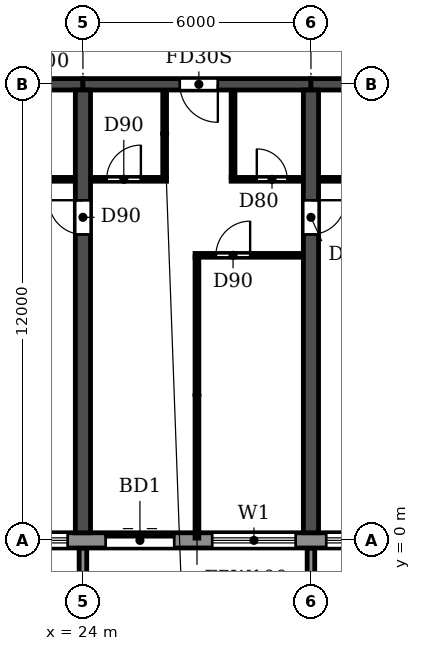
"""IFC4 building model, lengths in metres.
Left out: names, types, materials, properties, quantities, classifications, styles, units other than length and angle.
Written with IfcOpenShell. Run it as: python <this file> out.ifc"""

import sys

from ifc_helpers import new_model, si_unit, direction, frame, frame_2d, origin, place, context, subcontext, project, spatial, polyline, rectangle, outline, extrude, source, transform, mapped, element, fill, save


model = new_model("IFC4")
c1 = context("Model", 3, precision=1e-05, world=origin(), true_north=direction((0.0, 1.0)))
c2 = subcontext(c1, "Body", "Model", "MODEL_VIEW")
j1 = project(units=[si_unit("LENGTHUNIT", "METRE"), si_unit("PLANEANGLEUNIT", "RADIAN")], contexts=[c1])
p1 = place(None, origin())
s1 = spatial("IfcSite", under=j1, at=p1, CompositionType="ELEMENT")
p2 = place(p1, origin())
s2 = spatial("IfcBuilding", under=s1, at=p2, CompositionType="ELEMENT")
p3 = place(p2, frame((0.0, 0.0, 49.8)))
s3 = spatial("IfcBuildingStorey", under=s2, at=p3, CompositionType="ELEMENT", Elevation=49.8)
p4 = place(p3, frame((24.0, 0.2, 0.0), z_axis=(0.0, 0.0, 1.0), x_axis=(0.0, 1.0, 0.0)))
e1 = element("IfcWall", 1, at=p4, inside=s3, PredefinedType="SHEAR", context=c2, shape_type="SweptSolid", body=[
    extrude(rectangle(XDim=11.65, YDim=0.4, at=frame_2d((5.825, 0.0))), origin(), (0.0, 0.0, 1.0), 3.0),
])
p5 = place(p4, frame((7.85, 0.0, 0.0)))
e2 = element("IfcOpeningElement", 2, at=p5, cuts=e1, PredefinedType="OPENING", context=c2, shape_type="SweptSolid", body=[
    extrude(rectangle(XDim=0.9, YDim=2.1, at=frame_2d((0.45, 1.05))), frame((0.0, 0.21, 0.0), z_axis=(0.0, -1.0, 0.0), x_axis=(1.0, 0.0, 0.0)), (0.0, 0.0, 1.0), 0.42),
])
p6 = place(p3, frame((30.0, 0.2, 0.0), z_axis=(0.0, 0.0, 1.0), x_axis=(0.0, 1.0, 0.0)))
e3 = element("IfcWall", 3, at=p6, inside=s3, PredefinedType="SHEAR", context=c2, shape_type="SweptSolid", body=[
    extrude(rectangle(XDim=11.65, YDim=0.4, at=frame_2d((5.825, 0.0))), origin(), (0.0, 0.0, 1.0), 3.0),
])
p7 = place(p6, frame((7.85, 0.0, 0.0)))
e4 = element("IfcOpeningElement", 4, at=p7, cuts=e3, PredefinedType="OPENING", context=c2, shape_type="SweptSolid", body=[
    extrude(rectangle(XDim=0.9, YDim=2.1, at=frame_2d((0.45, 1.05))), frame((0.0, 0.21, 0.0), z_axis=(0.0, -1.0, 0.0), x_axis=(1.0, 0.0, 0.0)), (0.0, 0.0, 1.0), 0.42),
])
p8 = place(p3, frame((18.0, 12.0, 0.0), z_axis=(0.0, 0.0, 1.0), x_axis=(1.0, 0.0, 0.0)))
e5 = element("IfcWall", 5, at=p8, inside=s3, PredefinedType="SHEAR", context=c2, shape_type="SweptSolid", body=[
    extrude(rectangle(XDim=6.0, YDim=0.3, at=frame_2d((3.0, 0.0))), origin(), (0.0, 0.0, 1.0), 2.4),
])
p9 = place(p3, frame((24.0, 12.0, 0.0), z_axis=(0.0, 0.0, 1.0), x_axis=(1.0, 0.0, 0.0)))
e6 = element("IfcWall", 6, at=p9, inside=s3, PredefinedType="SHEAR", context=c2, shape_type="SweptSolid", body=[
    extrude(rectangle(XDim=6.0, YDim=0.3, at=frame_2d((3.0, 0.0))), origin(), (0.0, 0.0, 1.0), 2.4),
])
p10 = place(p9, frame((2.55, 0.0, 0.0)))
e7 = element("IfcOpeningElement", 7, at=p10, cuts=e6, PredefinedType="OPENING", context=c2, shape_type="SweptSolid", body=[
    extrude(rectangle(XDim=1.0, YDim=2.1, at=frame_2d((0.5, 1.05))), frame((0.0, 0.16, 0.0), z_axis=(0.0, -1.0, 0.0), x_axis=(1.0, 0.0, 0.0)), (0.0, 0.0, 1.0), 0.32),
])
p11 = place(p3, frame((30.0, 12.0, 0.0), z_axis=(0.0, 0.0, 1.0), x_axis=(1.0, 0.0, 0.0)))
e8 = element("IfcWall", 8, at=p11, inside=s3, PredefinedType="SHEAR", context=c2, shape_type="SweptSolid", body=[
    extrude(rectangle(XDim=6.0, YDim=0.3, at=frame_2d((3.0, 0.0))), origin(), (0.0, 0.0, 1.0), 2.4),
])
p12 = place(p3, frame((4.683, 0.0, 0.0), z_axis=(0.0, 0.0, 1.0), x_axis=(1.0, 0.0, 0.0)))
e9 = element("IfcWall", 9, at=p12, inside=s3, PredefinedType="STANDARD", context=c2, shape_type="SweptSolid", body=[
    extrude(rectangle(XDim=92.634, YDim=0.4, at=frame_2d((46.317, 0.0))), origin(), (0.0, 0.0, 1.0), 3.0),
])
p13 = place(p12, frame((1.717, 0.0, 0.9)))
e10 = element("IfcOpeningElement", 10, at=p13, cuts=e9, PredefinedType="OPENING", context=c2, shape_type="SweptSolid", body=[
    extrude(rectangle(XDim=2.2, YDim=1.5, at=frame_2d((1.1, 0.75))), frame((0.0, 0.21, 0.0), z_axis=(0.0, -1.0, 0.0), x_axis=(1.0, 0.0, 0.0)), (0.0, 0.0, 1.0), 0.42),
])
p14 = place(p12, frame((4.717, 0.0, 0.9)))
e11 = element("IfcOpeningElement", 11, at=p14, cuts=e9, PredefinedType="OPENING", context=c2, shape_type="SweptSolid", body=[
    extrude(rectangle(XDim=2.2, YDim=1.5, at=frame_2d((1.1, 0.75))), frame((0.0, 0.21, 0.0), z_axis=(0.0, -1.0, 0.0), x_axis=(1.0, 0.0, 0.0)), (0.0, 0.0, 1.0), 0.42),
])
p15 = place(p12, frame((7.717, 0.0, 0.9)))
e12 = element("IfcOpeningElement", 12, at=p15, cuts=e9, PredefinedType="OPENING", context=c2, shape_type="SweptSolid", body=[
    extrude(rectangle(XDim=2.2, YDim=1.5, at=frame_2d((1.1, 0.75))), frame((0.0, 0.21, 0.0), z_axis=(0.0, -1.0, 0.0), x_axis=(1.0, 0.0, 0.0)), (0.0, 0.0, 1.0), 0.42),
])
p16 = place(p12, frame((10.917, 0.0, 0.0)))
e13 = element("IfcOpeningElement", 13, at=p16, cuts=e9, PredefinedType="OPENING", context=c2, shape_type="SweptSolid", body=[
    extrude(rectangle(XDim=1.8, YDim=2.4, at=frame_2d((0.9, 1.2))), frame((0.0, 0.21, 0.0), z_axis=(0.0, -1.0, 0.0), x_axis=(1.0, 0.0, 0.0)), (0.0, 0.0, 1.0), 0.42),
])
p17 = place(p12, frame((13.717, 0.0, 0.9)))
e14 = element("IfcOpeningElement", 14, at=p17, cuts=e9, PredefinedType="OPENING", context=c2, shape_type="SweptSolid", body=[
    extrude(rectangle(XDim=2.2, YDim=1.5, at=frame_2d((1.1, 0.75))), frame((0.0, 0.21, 0.0), z_axis=(0.0, -1.0, 0.0), x_axis=(1.0, 0.0, 0.0)), (0.0, 0.0, 1.0), 0.42),
])
p18 = place(p12, frame((16.717, 0.0, 0.9)))
e15 = element("IfcOpeningElement", 15, at=p18, cuts=e9, PredefinedType="OPENING", context=c2, shape_type="SweptSolid", body=[
    extrude(rectangle(XDim=2.2, YDim=1.5, at=frame_2d((1.1, 0.75))), frame((0.0, 0.21, 0.0), z_axis=(0.0, -1.0, 0.0), x_axis=(1.0, 0.0, 0.0)), (0.0, 0.0, 1.0), 0.42),
])
p19 = place(p12, frame((19.917, 0.0, 0.0)))
e16 = element("IfcOpeningElement", 16, at=p19, cuts=e9, PredefinedType="OPENING", context=c2, shape_type="SweptSolid", body=[
    extrude(rectangle(XDim=1.8, YDim=2.4, at=frame_2d((0.9, 1.2))), frame((0.0, 0.21, 0.0), z_axis=(0.0, -1.0, 0.0), x_axis=(1.0, 0.0, 0.0)), (0.0, 0.0, 1.0), 0.42),
])
p20 = place(p12, frame((22.717, 0.0, 0.9)))
e17 = element("IfcOpeningElement", 17, at=p20, cuts=e9, PredefinedType="OPENING", context=c2, shape_type="SweptSolid", body=[
    extrude(rectangle(XDim=2.2, YDim=1.5, at=frame_2d((1.1, 0.75))), frame((0.0, 0.21, 0.0), z_axis=(0.0, -1.0, 0.0), x_axis=(1.0, 0.0, 0.0)), (0.0, 0.0, 1.0), 0.42),
])
p21 = place(p12, frame((25.717, 0.0, 0.9)))
e18 = element("IfcOpeningElement", 18, at=p21, cuts=e9, PredefinedType="OPENING", context=c2, shape_type="SweptSolid", body=[
    extrude(rectangle(XDim=2.2, YDim=1.5, at=frame_2d((1.1, 0.75))), frame((0.0, 0.21, 0.0), z_axis=(0.0, -1.0, 0.0), x_axis=(1.0, 0.0, 0.0)), (0.0, 0.0, 1.0), 0.42),
])
p22 = place(p12, frame((28.717, 0.0, 0.9)))
e19 = element("IfcOpeningElement", 19, at=p22, cuts=e9, PredefinedType="OPENING", context=c2, shape_type="SweptSolid", body=[
    extrude(rectangle(XDim=2.2, YDim=1.5, at=frame_2d((1.1, 0.75))), frame((0.0, 0.21, 0.0), z_axis=(0.0, -1.0, 0.0), x_axis=(1.0, 0.0, 0.0)), (0.0, 0.0, 1.0), 0.42),
])
p23 = place(p12, frame((31.717, 0.0, 0.9)))
e20 = element("IfcOpeningElement", 20, at=p23, cuts=e9, PredefinedType="OPENING", context=c2, shape_type="SweptSolid", body=[
    extrude(rectangle(XDim=2.2, YDim=1.5, at=frame_2d((1.1, 0.75))), frame((0.0, 0.21, 0.0), z_axis=(0.0, -1.0, 0.0), x_axis=(1.0, 0.0, 0.0)), (0.0, 0.0, 1.0), 0.42),
])
p24 = place(p12, frame((34.917, 0.0, 0.0)))
e21 = element("IfcOpeningElement", 21, at=p24, cuts=e9, PredefinedType="OPENING", context=c2, shape_type="SweptSolid", body=[
    extrude(rectangle(XDim=1.8, YDim=2.4, at=frame_2d((0.9, 1.2))), frame((0.0, 0.21, 0.0), z_axis=(0.0, -1.0, 0.0), x_axis=(1.0, 0.0, 0.0)), (0.0, 0.0, 1.0), 0.42),
])
p25 = place(p12, frame((37.717, 0.0, 0.9)))
e22 = element("IfcOpeningElement", 22, at=p25, cuts=e9, PredefinedType="OPENING", context=c2, shape_type="SweptSolid", body=[
    extrude(rectangle(XDim=2.2, YDim=1.5, at=frame_2d((1.1, 0.75))), frame((0.0, 0.21, 0.0), z_axis=(0.0, -1.0, 0.0), x_axis=(1.0, 0.0, 0.0)), (0.0, 0.0, 1.0), 0.42),
])
p26 = place(p12, frame((40.717, 0.0, 0.9)))
e23 = element("IfcOpeningElement", 23, at=p26, cuts=e9, PredefinedType="OPENING", context=c2, shape_type="SweptSolid", body=[
    extrude(rectangle(XDim=2.2, YDim=1.5, at=frame_2d((1.1, 0.75))), frame((0.0, 0.21, 0.0), z_axis=(0.0, -1.0, 0.0), x_axis=(1.0, 0.0, 0.0)), (0.0, 0.0, 1.0), 0.42),
])
p27 = place(p12, frame((43.717, 0.0, 0.9)))
e24 = element("IfcOpeningElement", 24, at=p27, cuts=e9, PredefinedType="OPENING", context=c2, shape_type="SweptSolid", body=[
    extrude(rectangle(XDim=2.2, YDim=1.5, at=frame_2d((1.1, 0.75))), frame((0.0, 0.21, 0.0), z_axis=(0.0, -1.0, 0.0), x_axis=(1.0, 0.0, 0.0)), (0.0, 0.0, 1.0), 0.42),
])
p28 = place(p12, frame((46.917, 0.0, 0.0)))
e25 = element("IfcOpeningElement", 25, at=p28, cuts=e9, PredefinedType="OPENING", context=c2, shape_type="SweptSolid", body=[
    extrude(rectangle(XDim=1.8, YDim=2.4, at=frame_2d((0.9, 1.2))), frame((0.0, 0.21, 0.0), z_axis=(0.0, -1.0, 0.0), x_axis=(1.0, 0.0, 0.0)), (0.0, 0.0, 1.0), 0.42),
])
p29 = place(p12, frame((49.717, 0.0, 0.9)))
e26 = element("IfcOpeningElement", 26, at=p29, cuts=e9, PredefinedType="OPENING", context=c2, shape_type="SweptSolid", body=[
    extrude(rectangle(XDim=2.2, YDim=1.5, at=frame_2d((1.1, 0.75))), frame((0.0, 0.21, 0.0), z_axis=(0.0, -1.0, 0.0), x_axis=(1.0, 0.0, 0.0)), (0.0, 0.0, 1.0), 0.42),
])
p30 = place(p12, frame((52.717, 0.0, 0.9)))
e27 = element("IfcOpeningElement", 27, at=p30, cuts=e9, PredefinedType="OPENING", context=c2, shape_type="SweptSolid", body=[
    extrude(rectangle(XDim=2.2, YDim=1.5, at=frame_2d((1.1, 0.75))), frame((0.0, 0.21, 0.0), z_axis=(0.0, -1.0, 0.0), x_axis=(1.0, 0.0, 0.0)), (0.0, 0.0, 1.0), 0.42),
])
p31 = place(p12, frame((55.717, 0.0, 0.9)))
e28 = element("IfcOpeningElement", 28, at=p31, cuts=e9, PredefinedType="OPENING", context=c2, shape_type="SweptSolid", body=[
    extrude(rectangle(XDim=2.2, YDim=1.5, at=frame_2d((1.1, 0.75))), frame((0.0, 0.21, 0.0), z_axis=(0.0, -1.0, 0.0), x_axis=(1.0, 0.0, 0.0)), (0.0, 0.0, 1.0), 0.42),
])
p32 = place(p12, frame((58.917, 0.0, 0.0)))
e29 = element("IfcOpeningElement", 29, at=p32, cuts=e9, PredefinedType="OPENING", context=c2, shape_type="SweptSolid", body=[
    extrude(rectangle(XDim=1.8, YDim=2.4, at=frame_2d((0.9, 1.2))), frame((0.0, 0.21, 0.0), z_axis=(0.0, -1.0, 0.0), x_axis=(1.0, 0.0, 0.0)), (0.0, 0.0, 1.0), 0.42),
])
p33 = place(p12, frame((61.717, 0.0, 0.9)))
e30 = element("IfcOpeningElement", 30, at=p33, cuts=e9, PredefinedType="OPENING", context=c2, shape_type="SweptSolid", body=[
    extrude(rectangle(XDim=2.2, YDim=1.5, at=frame_2d((1.1, 0.75))), frame((0.0, 0.21, 0.0), z_axis=(0.0, -1.0, 0.0), x_axis=(1.0, 0.0, 0.0)), (0.0, 0.0, 1.0), 0.42),
])
p34 = place(p12, frame((64.717, 0.0, 0.9)))
e31 = element("IfcOpeningElement", 31, at=p34, cuts=e9, PredefinedType="OPENING", context=c2, shape_type="SweptSolid", body=[
    extrude(rectangle(XDim=2.2, YDim=1.5, at=frame_2d((1.1, 0.75))), frame((0.0, 0.21, 0.0), z_axis=(0.0, -1.0, 0.0), x_axis=(1.0, 0.0, 0.0)), (0.0, 0.0, 1.0), 0.42),
])
p35 = place(p12, frame((67.717, 0.0, 0.9)))
e32 = element("IfcOpeningElement", 32, at=p35, cuts=e9, PredefinedType="OPENING", context=c2, shape_type="SweptSolid", body=[
    extrude(rectangle(XDim=2.2, YDim=1.5, at=frame_2d((1.1, 0.75))), frame((0.0, 0.21, 0.0), z_axis=(0.0, -1.0, 0.0), x_axis=(1.0, 0.0, 0.0)), (0.0, 0.0, 1.0), 0.42),
])
p36 = place(p12, frame((70.917, 0.0, 0.0)))
e33 = element("IfcOpeningElement", 33, at=p36, cuts=e9, PredefinedType="OPENING", context=c2, shape_type="SweptSolid", body=[
    extrude(rectangle(XDim=1.8, YDim=2.4, at=frame_2d((0.9, 1.2))), frame((0.0, 0.21, 0.0), z_axis=(0.0, -1.0, 0.0), x_axis=(1.0, 0.0, 0.0)), (0.0, 0.0, 1.0), 0.42),
])
p37 = place(p12, frame((73.717, 0.0, 0.9)))
e34 = element("IfcOpeningElement", 34, at=p37, cuts=e9, PredefinedType="OPENING", context=c2, shape_type="SweptSolid", body=[
    extrude(rectangle(XDim=2.2, YDim=1.5, at=frame_2d((1.1, 0.75))), frame((0.0, 0.21, 0.0), z_axis=(0.0, -1.0, 0.0), x_axis=(1.0, 0.0, 0.0)), (0.0, 0.0, 1.0), 0.42),
])
p38 = place(p12, frame((76.717, 0.0, 0.9)))
e35 = element("IfcOpeningElement", 35, at=p38, cuts=e9, PredefinedType="OPENING", context=c2, shape_type="SweptSolid", body=[
    extrude(rectangle(XDim=2.2, YDim=1.5, at=frame_2d((1.1, 0.75))), frame((0.0, 0.21, 0.0), z_axis=(0.0, -1.0, 0.0), x_axis=(1.0, 0.0, 0.0)), (0.0, 0.0, 1.0), 0.42),
])
p39 = place(p12, frame((79.717, 0.0, 0.9)))
e36 = element("IfcOpeningElement", 36, at=p39, cuts=e9, PredefinedType="OPENING", context=c2, shape_type="SweptSolid", body=[
    extrude(rectangle(XDim=2.2, YDim=1.5, at=frame_2d((1.1, 0.75))), frame((0.0, 0.21, 0.0), z_axis=(0.0, -1.0, 0.0), x_axis=(1.0, 0.0, 0.0)), (0.0, 0.0, 1.0), 0.42),
])
p40 = place(p12, frame((82.917, 0.0, 0.0)))
e37 = element("IfcOpeningElement", 37, at=p40, cuts=e9, PredefinedType="OPENING", context=c2, shape_type="SweptSolid", body=[
    extrude(rectangle(XDim=1.8, YDim=2.4, at=frame_2d((0.9, 1.2))), frame((0.0, 0.21, 0.0), z_axis=(0.0, -1.0, 0.0), x_axis=(1.0, 0.0, 0.0)), (0.0, 0.0, 1.0), 0.42),
])
p41 = place(p12, frame((85.717, 0.0, 0.9)))
e38 = element("IfcOpeningElement", 38, at=p41, cuts=e9, PredefinedType="OPENING", context=c2, shape_type="SweptSolid", body=[
    extrude(rectangle(XDim=2.2, YDim=1.5, at=frame_2d((1.1, 0.75))), frame((0.0, 0.21, 0.0), z_axis=(0.0, -1.0, 0.0), x_axis=(1.0, 0.0, 0.0)), (0.0, 0.0, 1.0), 0.42),
])
p42 = place(p12, frame((88.717, 0.0, 0.9)))
e39 = element("IfcOpeningElement", 39, at=p42, cuts=e9, PredefinedType="OPENING", context=c2, shape_type="SweptSolid", body=[
    extrude(rectangle(XDim=2.2, YDim=1.5, at=frame_2d((1.1, 0.75))), frame((0.0, 0.21, 0.0), z_axis=(0.0, -1.0, 0.0), x_axis=(1.0, 0.0, 0.0)), (0.0, 0.0, 1.0), 0.42),
])
m1 = source(origin(), c2, "Body", "SweptSolid", [
    extrude(outline(polyline([(0.0, 0.0), (0.2, 0.0), (0.2, 1.65), (0.0, 1.65), (0.0, 0.0)])), origin(), (0.0, 0.0, 1.0), 3.1),
])
for number, where in (
    (40, (23.9, -1.85, 0.0)),
    (41, (29.9, -1.85, 0.0)),
):
    element("IfcWall", number, at=place(p3, frame(where)), inside=s3, PredefinedType="STANDARD", context=c2, shape_type="MappedRepresentation", body=[
        mapped(m1, transform((0.0, 0.0, 0.0))),
    ])
p43 = place(p3, frame((26.95, 7.5, 0.0), z_axis=(0.0, 0.0, 1.0), x_axis=(1.0, 0.0, 0.0)))
e42 = element("IfcWall", 42, at=p43, inside=s3, PredefinedType="PARTITIONING", context=c2, shape_type="SweptSolid", body=[
    extrude(rectangle(XDim=2.84, YDim=0.1, at=frame_2d((1.42, 0.0))), origin(), (0.0, 0.0, 1.0), 3.0),
])
p44 = place(p43, frame((0.55, 0.0, 0.0)))
e43 = element("IfcOpeningElement", 43, at=p44, cuts=e42, PredefinedType="OPENING", context=c2, shape_type="SweptSolid", body=[
    extrude(rectangle(XDim=0.9, YDim=2.1, at=frame_2d((0.45, 1.05))), frame((0.0, 0.06, 0.0), z_axis=(0.0, -1.0, 0.0), x_axis=(1.0, 0.0, 0.0)), (0.0, 0.0, 1.0), 0.12),
])
p45 = place(p3, frame((21.1, 9.5, 0.0), z_axis=(0.0, 0.0, 1.0), x_axis=(1.0, 0.0, 0.0)))
e44 = element("IfcWall", 44, at=p45, inside=s3, PredefinedType="PARTITIONING", context=c2, shape_type="SweptSolid", body=[
    extrude(rectangle(XDim=2.69, YDim=0.1, at=frame_2d((1.345, 0.0))), origin(), (0.0, 0.0, 1.0), 3.0),
])
p46 = place(p45, frame((1.0, 0.0, 0.0)))
e45 = element("IfcOpeningElement", 45, at=p46, cuts=e44, PredefinedType="OPENING", context=c2, shape_type="SweptSolid", body=[
    extrude(rectangle(XDim=0.8, YDim=2.1, at=frame_2d((0.4, 1.05))), frame((0.0, 0.06, 0.0), z_axis=(0.0, -1.0, 0.0), x_axis=(1.0, 0.0, 0.0)), (0.0, 0.0, 1.0), 0.12),
])
p47 = place(p3, frame((24.21, 9.5, 0.0), z_axis=(0.0, 0.0, 1.0), x_axis=(1.0, 0.0, 0.0)))
e46 = element("IfcWall", 46, at=p47, inside=s3, PredefinedType="PARTITIONING", context=c2, shape_type="SweptSolid", body=[
    extrude(rectangle(XDim=1.99, YDim=0.1, at=frame_2d((0.995, 0.0))), origin(), (0.0, 0.0, 1.0), 3.0),
])
p48 = place(p47, frame((0.415, 0.0, 0.0)))
e47 = element("IfcOpeningElement", 47, at=p48, cuts=e46, PredefinedType="OPENING", context=c2, shape_type="SweptSolid", body=[
    extrude(rectangle(XDim=0.9, YDim=2.1, at=frame_2d((0.45, 1.05))), frame((0.0, 0.06, 0.0), z_axis=(0.0, -1.0, 0.0), x_axis=(1.0, 0.0, 0.0)), (0.0, 0.0, 1.0), 0.12),
])
p49 = place(p3, frame((27.9, 9.5, 0.0), z_axis=(0.0, 0.0, 1.0), x_axis=(1.0, 0.0, 0.0)))
e48 = element("IfcWall", 48, at=p49, inside=s3, PredefinedType="PARTITIONING", context=c2, shape_type="SweptSolid", body=[
    extrude(rectangle(XDim=1.89, YDim=0.1, at=frame_2d((0.945, 0.0))), origin(), (0.0, 0.0, 1.0), 3.0),
])
p50 = place(p49, frame((0.675, 0.0, 0.0)))
e49 = element("IfcOpeningElement", 49, at=p50, cuts=e48, PredefinedType="OPENING", context=c2, shape_type="SweptSolid", body=[
    extrude(rectangle(XDim=0.8, YDim=2.1, at=frame_2d((0.4, 1.05))), frame((0.0, 0.06, 0.0), z_axis=(0.0, -1.0, 0.0), x_axis=(1.0, 0.0, 0.0)), (0.0, 0.0, 1.0), 0.12),
])
p51 = place(p3, frame((30.21, 9.5, 0.0), z_axis=(0.0, 0.0, 1.0), x_axis=(1.0, 0.0, 0.0)))
e50 = element("IfcWall", 50, at=p51, inside=s3, PredefinedType="PARTITIONING", context=c2, shape_type="SweptSolid", body=[
    extrude(rectangle(XDim=2.69, YDim=0.1, at=frame_2d((1.345, 0.0))), origin(), (0.0, 0.0, 1.0), 3.0),
])
p52 = place(p51, frame((0.89, 0.0, 0.0)))
e51 = element("IfcOpeningElement", 51, at=p52, cuts=e50, PredefinedType="OPENING", context=c2, shape_type="SweptSolid", body=[
    extrude(rectangle(XDim=0.8, YDim=2.1, at=frame_2d((0.4, 1.05))), frame((0.0, 0.06, 0.0), z_axis=(0.0, -1.0, 0.0), x_axis=(1.0, 0.0, 0.0)), (0.0, 0.0, 1.0), 0.12),
])
p53 = place(p3, frame((26.15, 9.55, 0.0), z_axis=(0.0, 0.0, 1.0), x_axis=(0.0, 1.0, 0.0)))
e52 = element("IfcWall", 52, at=p53, inside=s3, PredefinedType="PARTITIONING", context=c2, shape_type="SweptSolid", body=[
    extrude(rectangle(XDim=2.29, YDim=0.1, at=frame_2d((1.145, 0.0))), origin(), (0.0, 0.0, 1.0), 3.0),
])
p54 = place(p3, frame((27.0, 0.06, 0.0), z_axis=(0.0, 0.0, 1.0), x_axis=(0.0, 1.0, 0.0)))
e53 = element("IfcWall", 53, at=p54, inside=s3, PredefinedType="PARTITIONING", context=c2, shape_type="SweptSolid", body=[
    extrude(rectangle(XDim=7.39, YDim=0.1, at=frame_2d((3.695, 0.0))), origin(), (0.0, 0.0, 1.0), 3.0),
])
p55 = place(p3, frame((27.95, 9.55, 0.0), z_axis=(0.0, 0.0, 1.0), x_axis=(0.0, 1.0, 0.0)))
e54 = element("IfcWall", 54, at=p55, inside=s3, PredefinedType="PARTITIONING", context=c2, shape_type="SweptSolid", body=[
    extrude(rectangle(XDim=2.29, YDim=0.1, at=frame_2d((1.145, 0.0))), origin(), (0.0, 0.0, 1.0), 3.0),
])
p56 = place(p18, origin())
e55 = element("IfcWindow", 55, at=p56, inside=s3, PartitioningType="DOUBLE_PANEL_HORIZONTAL", PredefinedType="WINDOW", context=c2, shape_type="SweptSolid", body=[
    extrude(rectangle(XDim=2.2, YDim=1.5, at=frame_2d((1.1, 0.75))), frame((0.0, 0.03, 0.0), z_axis=(0.0, -1.0, 0.0), x_axis=(1.0, 0.0, 0.0)), (0.0, 0.0, 1.0), 0.06),
])
fill(e15, e55)
p57 = place(p19, origin())
e56 = element("IfcDoor", 56, at=p57, inside=s3, OperationType="DOUBLE_DOOR_SLIDING", PredefinedType="DOOR", context=c2, shape_type="SweptSolid", body=[
    extrude(rectangle(XDim=1.8, YDim=2.4, at=frame_2d((0.9, 1.2))), frame((0.0, 0.025, 0.0), z_axis=(0.0, -1.0, 0.0), x_axis=(1.0, 0.0, 0.0)), (0.0, 0.0, 1.0), 0.05),
])
fill(e16, e56)
p58 = place(p20, origin())
e57 = element("IfcWindow", 57, at=p58, inside=s3, PartitioningType="DOUBLE_PANEL_HORIZONTAL", PredefinedType="WINDOW", context=c2, shape_type="SweptSolid", body=[
    extrude(rectangle(XDim=2.2, YDim=1.5, at=frame_2d((1.1, 0.75))), frame((0.0, 0.03, 0.0), z_axis=(0.0, -1.0, 0.0), x_axis=(1.0, 0.0, 0.0)), (0.0, 0.0, 1.0), 0.06),
])
fill(e17, e57)
p59 = place(p21, origin())
e58 = element("IfcWindow", 58, at=p59, inside=s3, PartitioningType="DOUBLE_PANEL_HORIZONTAL", PredefinedType="WINDOW", context=c2, shape_type="SweptSolid", body=[
    extrude(rectangle(XDim=2.2, YDim=1.5, at=frame_2d((1.1, 0.75))), frame((0.0, 0.03, 0.0), z_axis=(0.0, -1.0, 0.0), x_axis=(1.0, 0.0, 0.0)), (0.0, 0.0, 1.0), 0.06),
])
fill(e18, e58)
p60 = place(p5, origin())
e59 = element("IfcDoor", 59, at=p60, inside=s3, OperationType="SINGLE_SWING_RIGHT", PredefinedType="DOOR", context=c2, shape_type="SweptSolid", body=[
    extrude(rectangle(XDim=0.9, YDim=2.1, at=frame_2d((0.45, 1.05))), frame((0.0, 0.025, 0.0), z_axis=(0.0, -1.0, 0.0), x_axis=(1.0, 0.0, 0.0)), (0.0, 0.0, 1.0), 0.05),
])
fill(e2, e59)
p61 = place(p48, origin())
e60 = element("IfcDoor", 60, at=p61, inside=s3, OperationType="SINGLE_SWING_RIGHT", PredefinedType="DOOR", context=c2, shape_type="SweptSolid", body=[
    extrude(rectangle(XDim=0.9, YDim=2.1, at=frame_2d((0.45, 1.05))), frame((0.0, 0.025, 0.0), z_axis=(0.0, -1.0, 0.0), x_axis=(1.0, 0.0, 0.0)), (0.0, 0.0, 1.0), 0.05),
])
fill(e47, e60)
p62 = place(p10, frame((1.0, 0.0, 0.0), z_axis=(0.0, 0.0, 1.0), x_axis=(-1.0, 0.0, 0.0)))
e61 = element("IfcDoor", 61, at=p62, inside=s3, OperationType="SINGLE_SWING_LEFT", PredefinedType="DOOR", context=c2, shape_type="SweptSolid", body=[
    extrude(rectangle(XDim=1.0, YDim=2.1, at=frame_2d((0.5, 1.05))), frame((0.0, 0.025, 0.0), z_axis=(0.0, -1.0, 0.0), x_axis=(1.0, 0.0, 0.0)), (0.0, 0.0, 1.0), 0.05),
])
fill(e7, e61)
p63 = place(p44, origin())
e62 = element("IfcDoor", 62, at=p63, inside=s3, OperationType="SINGLE_SWING_RIGHT", PredefinedType="DOOR", context=c2, shape_type="SweptSolid", body=[
    extrude(rectangle(XDim=0.9, YDim=2.1, at=frame_2d((0.45, 1.05))), frame((0.0, 0.025, 0.0), z_axis=(0.0, -1.0, 0.0), x_axis=(1.0, 0.0, 0.0)), (0.0, 0.0, 1.0), 0.05),
])
fill(e43, e62)
p64 = place(p50, origin())
e63 = element("IfcDoor", 63, at=p64, inside=s3, OperationType="SINGLE_SWING_LEFT", PredefinedType="DOOR", context=c2, shape_type="SweptSolid", body=[
    extrude(rectangle(XDim=0.8, YDim=2.1, at=frame_2d((0.4, 1.05))), frame((0.0, 0.025, 0.0), z_axis=(0.0, -1.0, 0.0), x_axis=(1.0, 0.0, 0.0)), (0.0, 0.0, 1.0), 0.05),
])
fill(e49, e63)
p65 = place(p7, frame((0.9, 0.0, 0.0), z_axis=(0.0, 0.0, 1.0), x_axis=(-1.0, 0.0, 0.0)))
e64 = element("IfcDoor", 64, at=p65, inside=s3, OperationType="SINGLE_SWING_LEFT", PredefinedType="DOOR", context=c2, shape_type="SweptSolid", body=[
    extrude(rectangle(XDim=0.9, YDim=2.1, at=frame_2d((0.45, 1.05))), frame((0.0, 0.025, 0.0), z_axis=(0.0, -1.0, 0.0), x_axis=(1.0, 0.0, 0.0)), (0.0, 0.0, 1.0), 0.05),
])
fill(e4, e64)
save(model, sys.argv[1])
